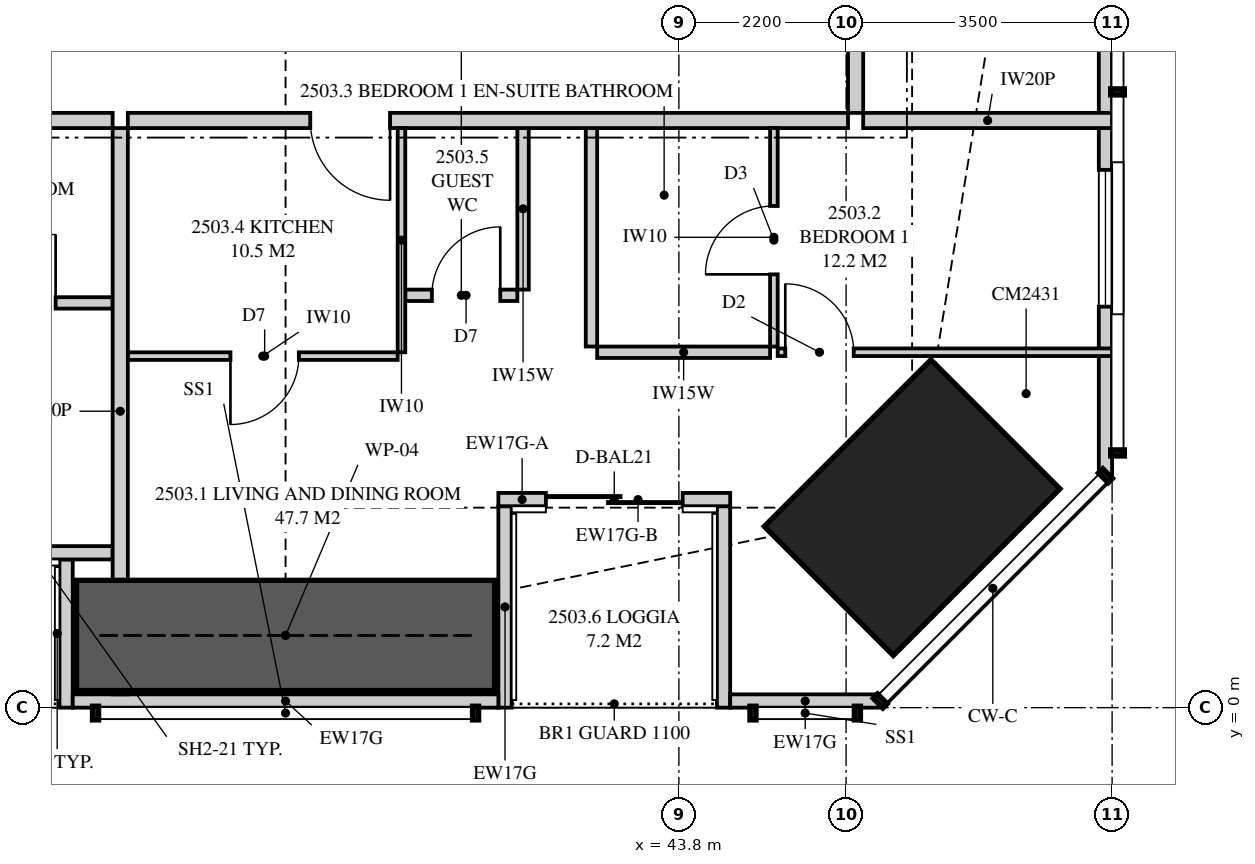
"""IFC4 building model, lengths in metres.
Left out: names, types, materials, properties, quantities, classifications, styles, units other than length and angle.
Written with IfcOpenShell. Run it as: python <this file> out.ifc"""

import sys

from ifc_helpers import new_model, si_unit, direction, frame, frame_2d, origin, origin_2d, place, context, subcontext, project, spatial, polyline, rectangle, outline, extrude, element, fill, save


model = new_model("IFC4")
c1 = context("Model", 3, precision=1e-05, world=origin(), true_north=direction((0.0, 1.0)))
c2 = subcontext(c1, "Body", "Model", "MODEL_VIEW")
j1 = project(units=[si_unit("LENGTHUNIT", "METRE"), si_unit("PLANEANGLEUNIT", "RADIAN")], contexts=[c1])
p1 = place(None, origin())
s1 = spatial("IfcSite", under=j1, at=p1, CompositionType="ELEMENT")
p2 = place(p1, origin())
s2 = spatial("IfcBuilding", under=s1, at=p2, CompositionType="ELEMENT")
p3 = place(p2, frame((0.0, 0.0, 94.8)))
s3 = spatial("IfcBuildingStorey", under=s2, at=p3, CompositionType="ELEMENT", Elevation=94.8)
p4 = place(p3, frame((46.869, 2.631, 0.0), z_axis=(0.0, 0.0, 1.0), x_axis=(-0.707106781187, 0.707106781187, 0.0)))
e1 = element("IfcColumn", 1, at=p4, inside=s3, PredefinedType="COLUMN", context=c2, shape_type="SweptSolid", body=[
    extrude(rectangle(XDim=2.4, YDim=3.1, at=origin_2d()), origin(), (0.0, 0.0, 1.0), 3.35),
])
p5 = place(p3, frame((35.825, 0.087, 0.0), z_axis=(0.0, 0.0, 1.0), x_axis=(1.0, 0.0, 0.0)))
e2 = element("IfcWall", 2, at=p5, inside=s3, PredefinedType="SOLIDWALL", context=c2, shape_type="SweptSolid", body=[
    extrude(outline(polyline([(0.0, 0.0), (5.6, 0.0), (5.6, 3.11), (3.003, 3.11), (3.003, 2.15), (2.958, 2.15), (2.958, 3.11), (2.8, 3.11), (2.8, 2.15), (0.0, 2.15), (0.0, 0.0)])), frame((0.0, 0.087, 0.0), z_axis=(0.0, -1.0, 0.0), x_axis=(1.0, 0.0, 0.0)), (0.0, 0.0, 1.0), 0.175),
])
p6 = place(p3, frame((44.475, 0.087, 0.0), z_axis=(0.0, 0.0, 1.0), x_axis=(1.0, 0.0, 0.0)))
e3 = element("IfcWall", 3, at=p6, inside=s3, PredefinedType="SOLIDWALL", context=c2, shape_type="SweptSolid", body=[
    extrude(rectangle(XDim=1.974, YDim=0.175, at=frame_2d((0.987, 0.0))), origin(), (0.0, 0.0, 1.0), 3.11),
])
p7 = place(p3, frame((32.775, 2.038, 0.0), z_axis=(0.0, 0.0, 1.0), x_axis=(1.0, 0.0, 0.0)))
e4 = element("IfcWall", 4, at=p7, inside=s3, PredefinedType="SOLIDWALL", context=c2, shape_type="SweptSolid", body=[
    extrude(rectangle(XDim=3.575, YDim=0.175, at=frame_2d((1.788, 0.0))), origin(), (0.0, 0.0, 1.0), 3.11),
])
p8 = place(p7, frame((0.625, 0.0, 0.0)))
e5 = element("IfcOpeningElement", 5, at=p8, cuts=e4, PredefinedType="OPENING", context=c2, shape_type="SweptSolid", body=[
    extrude(rectangle(XDim=1.8, YDim=2.1, at=frame_2d((0.9, 1.05))), frame((0.0, 0.097, 0.0), z_axis=(0.0, -1.0, 0.0), x_axis=(1.0, 0.0, 0.0)), (0.0, 0.0, 1.0), 0.195),
])
p9 = place(p3, frame((35.738, 0.0, 0.0), z_axis=(0.0, 0.0, 1.0), x_axis=(0.0, 1.0, 0.0)))
e6 = element("IfcWall", 6, at=p9, inside=s3, PredefinedType="SOLIDWALL", context=c2, shape_type="SweptSolid", body=[
    extrude(outline(polyline([(0.0, 0.0), (1.95, 0.0), (1.95, 3.11), (1.75, 3.11), (1.75, 2.15), (0.15, 2.15), (0.15, 3.11), (0.0, 3.11), (0.0, 0.0)])), frame((0.0, 0.087, 0.0), z_axis=(0.0, -1.0, 0.0), x_axis=(1.0, 0.0, 0.0)), (0.0, 0.0, 1.0), 0.175),
])
p10 = place(p3, frame((41.425, 2.738, 0.0), z_axis=(0.0, 0.0, 1.0), x_axis=(1.0, 0.0, 0.0)))
e7 = element("IfcWall", 7, at=p10, inside=s3, PredefinedType="SOLIDWALL", context=c2, shape_type="SweptSolid", body=[
    extrude(rectangle(XDim=0.625, YDim=0.175, at=frame_2d((0.312, 0.0))), origin(), (0.0, 0.0, 1.0), 2.51),
])
p11 = place(p3, frame((42.05, 2.738, 0.0), z_axis=(0.0, 0.0, 1.0), x_axis=(1.0, 0.0, 0.0)))
e8 = element("IfcWall", 8, at=p11, inside=s3, PredefinedType="SOLIDWALL", context=c2, shape_type="SweptSolid", body=[
    extrude(rectangle(XDim=2.425, YDim=0.175, at=frame_2d((1.212, 0.0))), origin(), (0.0, 0.0, 1.0), 2.15),
])
p12 = place(p11, origin())
e9 = element("IfcOpeningElement", 9, at=p12, cuts=e8, PredefinedType="OPENING", context=c2, shape_type="SweptSolid", body=[
    extrude(rectangle(XDim=1.8, YDim=2.1, at=frame_2d((0.9, 1.05))), frame((0.0, 0.097, 0.0), z_axis=(0.0, -1.0, 0.0), x_axis=(1.0, 0.0, 0.0)), (0.0, 0.0, 1.0), 0.195),
])
p13 = place(p3, frame((41.512, 0.0, 0.0), z_axis=(0.0, 0.0, 1.0), x_axis=(0.0, 1.0, 0.0)))
e10 = element("IfcWall", 10, at=p13, inside=s3, PredefinedType="SOLIDWALL", context=c2, shape_type="SweptSolid", body=[
    extrude(outline(polyline([(0.0, 0.0), (2.65, 0.0), (2.65, 2.51), (2.373, 2.51), (2.373, 2.15), (0.705, 2.15), (0.705, 3.11), (0.0, 3.11), (0.0, 0.0)])), frame((0.0, 0.087, 0.0), z_axis=(0.0, -1.0, 0.0), x_axis=(1.0, 0.0, 0.0)), (0.0, 0.0, 1.0), 0.175),
])
p14 = place(p3, frame((44.387, 0.0, 0.0), z_axis=(0.0, 0.0, 1.0), x_axis=(0.0, 1.0, 0.0)))
e11 = element("IfcWall", 11, at=p14, inside=s3, PredefinedType="SOLIDWALL", context=c2, shape_type="SweptSolid", body=[
    extrude(outline(polyline([(0.0, 0.0), (2.65, 0.0), (2.65, 2.15), (1.291, 2.15), (1.291, 3.11), (0.0, 3.11), (0.0, 0.0)])), frame((0.0, 0.087, 0.0), z_axis=(0.0, -1.0, 0.0), x_axis=(1.0, 0.0, 0.0)), (0.0, 0.0, 1.0), 0.175),
])
p15 = place(p3, frame((49.413, 3.051, 0.0), z_axis=(0.0, 0.0, 1.0), x_axis=(0.0, 1.0, 0.0)))
e12 = element("IfcWall", 12, at=p15, inside=s3, PredefinedType="SOLIDWALL", context=c2, shape_type="SweptSolid", body=[
    extrude(outline(polyline([(0.0, 0.0), (31.897, 0.0), (31.897, 3.11), (22.167, 3.11), (22.167, 2.15), (22.074, 2.15), (22.074, 3.11), (21.949, 3.11), (21.949, 2.15), (9.949, 2.15), (9.949, 3.11), (9.823, 3.11), (9.823, 2.15), (9.73, 2.15), (9.73, 3.11), (0.0, 3.11), (0.0, 0.0)])), frame((0.0, 0.087, 0.0), z_axis=(0.0, -1.0, 0.0), x_axis=(1.0, 0.0, 0.0)), (0.0, 0.0, 1.0), 0.175),
])
p16 = place(p15, frame((2.224, 0.0, 0.4)))
e13 = element("IfcOpeningElement", 13, at=p16, cuts=e12, PredefinedType="OPENING", context=c2, shape_type="SweptSolid", body=[
    extrude(rectangle(XDim=1.8, YDim=1.7, at=frame_2d((0.9, 0.85))), frame((0.0, 0.097, 0.0), z_axis=(0.0, -1.0, 0.0), x_axis=(1.0, 0.0, 0.0)), (0.0, 0.0, 1.0), 0.195),
])
p17 = place(p15, frame((14.849, 0.0, 0.4)))
e14 = element("IfcOpeningElement", 14, at=p17, cuts=e12, PredefinedType="OPENING", context=c2, shape_type="SweptSolid", body=[
    extrude(rectangle(XDim=1.2, YDim=1.7, at=frame_2d((0.6, 0.85))), frame((0.0, 0.097, 0.0), z_axis=(0.0, -1.0, 0.0), x_axis=(1.0, 0.0, 0.0)), (0.0, 0.0, 1.0), 0.195),
])
p18 = place(p15, frame((27.373, 0.0, 0.4)))
e15 = element("IfcOpeningElement", 15, at=p18, cuts=e12, PredefinedType="OPENING", context=c2, shape_type="SweptSolid", body=[
    extrude(rectangle(XDim=1.8, YDim=1.7, at=frame_2d((0.9, 0.85))), frame((0.0, 0.097, 0.0), z_axis=(0.0, -1.0, 0.0), x_axis=(1.0, 0.0, 0.0)), (0.0, 0.0, 1.0), 0.195),
])
p19 = place(p3, frame((36.45, 0.175, 0.0), z_axis=(0.0, 0.0, 1.0), x_axis=(0.0, 1.0, 0.0)))
e16 = element("IfcWall", 16, at=p19, inside=s3, PredefinedType="PARTITIONING", context=c2, shape_type="SweptSolid", body=[
    extrude(outline(polyline([(0.529, 2.15), (0.0, 2.15), (0.0, 0.0), (0.529, 0.0), (0.529, 0.017), (1.021, 0.017), (1.021, 0.0), (7.45, 0.0), (7.45, 3.11), (1.685, 3.11), (1.685, 2.15), (1.021, 2.15), (1.021, 2.133), (0.529, 2.133), (0.529, 2.15)])), frame((0.0, 0.1, 0.0), z_axis=(0.0, -1.0, 0.0), x_axis=(1.0, 0.0, 0.0)), (0.0, 0.0, 1.0), 0.2),
])
p20 = place(p3, frame((28.9, 7.725, 0.0), z_axis=(0.0, 0.0, 1.0), x_axis=(1.0, 0.0, 0.0)))
e17 = element("IfcWall", 17, at=p20, inside=s3, PredefinedType="PARTITIONING", context=c2, shape_type="SweptSolid", body=[
    extrude(rectangle(XDim=7.45, YDim=0.2, at=frame_2d((3.725, 0.0))), origin(), (0.0, 0.0, 1.0), 3.11),
])
p21 = place(p20, frame((3.225, 0.0, 0.0)))
e18 = element("IfcOpeningElement", 18, at=p21, cuts=e17, PredefinedType="OPENING", context=c2, shape_type="SweptSolid", body=[
    extrude(rectangle(XDim=1.05, YDim=2.2, at=frame_2d((0.525, 1.1))), frame((0.0, 0.11, 0.0), z_axis=(0.0, -1.0, 0.0), x_axis=(1.0, 0.0, 0.0)), (0.0, 0.0, 1.0), 0.22),
])
p22 = place(p3, frame((33.925, 5.325, 0.0), z_axis=(0.0, 0.0, 1.0), x_axis=(1.0, 0.0, 0.0)))
e19 = element("IfcWall", 19, at=p22, inside=s3, PredefinedType="PLUMBINGWALL", context=c2, shape_type="SweptSolid", body=[
    extrude(rectangle(XDim=2.425, YDim=0.15, at=frame_2d((1.212, 0.0))), origin(), (0.0, 0.0, 1.0), 3.11),
])
p23 = place(p22, frame((0.775, 0.0, 0.0)))
e20 = element("IfcOpeningElement", 20, at=p23, cuts=e19, PredefinedType="OPENING", context=c2, shape_type="SweptSolid", body=[
    extrude(rectangle(XDim=0.9, YDim=2.1, at=frame_2d((0.45, 1.05))), frame((0.0, 0.085, 0.0), z_axis=(0.0, -1.0, 0.0), x_axis=(1.0, 0.0, 0.0)), (0.0, 0.0, 1.0), 0.17),
])
p24 = place(p3, frame((36.55, 7.725, 0.0), z_axis=(0.0, 0.0, 1.0), x_axis=(1.0, 0.0, 0.0)))
e21 = element("IfcWall", 21, at=p24, inside=s3, PredefinedType="PARTITIONING", context=c2, shape_type="SweptSolid", body=[
    extrude(outline(polyline([(0.0, 0.0), (9.475, 0.0), (9.475, 3.11), (2.412, 3.11), (2.412, 2.541), (1.738, 2.541), (1.738, 3.11), (0.0, 3.11), (0.0, 0.0)])), frame((0.0, 0.1, 0.0), z_axis=(0.0, -1.0, 0.0), x_axis=(1.0, 0.0, 0.0)), (0.0, 0.0, 1.0), 0.2),
])
p25 = place(p24, frame((2.4, 0.0, 0.0)))
e22 = element("IfcOpeningElement", 22, at=p25, cuts=e21, PredefinedType="OPENING", context=c2, shape_type="SweptSolid", body=[
    extrude(rectangle(XDim=1.05, YDim=2.2, at=frame_2d((0.525, 1.1))), frame((0.0, 0.11, 0.0), z_axis=(0.0, -1.0, 0.0), x_axis=(1.0, 0.0, 0.0)), (0.0, 0.0, 1.0), 0.22),
])
p26 = place(p3, frame((45.05, 4.751, 0.0), z_axis=(0.0, 0.0, 1.0), x_axis=(0.0, 1.0, 0.0)))
e23 = element("IfcWall", 23, at=p26, inside=s3, PredefinedType="PARTITIONING", context=c2, shape_type="SweptSolid", body=[
    extrude(rectangle(XDim=2.874, YDim=0.1, at=frame_2d((1.437, 0.0))), origin(), (0.0, 0.0, 1.0), 3.11),
])
p27 = place(p26, frame((0.949, 0.0, 0.0)))
e24 = element("IfcOpeningElement", 24, at=p27, cuts=e23, PredefinedType="OPENING", context=c2, shape_type="SweptSolid", body=[
    extrude(rectangle(XDim=0.9, YDim=2.1, at=frame_2d((0.45, 1.05))), frame((0.0, 0.06, 0.0), z_axis=(0.0, -1.0, 0.0), x_axis=(1.0, 0.0, 0.0)), (0.0, 0.0, 1.0), 0.12),
])
p28 = place(p3, frame((45.1, 4.676, 0.0), z_axis=(0.0, 0.0, 1.0), x_axis=(1.0, 0.0, 0.0)))
e25 = element("IfcWall", 25, at=p28, inside=s3, PredefinedType="PARTITIONING", context=c2, shape_type="SweptSolid", body=[
    extrude(outline(polyline([(0.0, 0.0), (4.4, 0.0), (4.4, 3.11), (2.971, 3.11), (2.971, 2.15), (1.229, 2.15), (1.229, 3.11), (0.0, 3.11), (0.0, 0.0)])), frame((0.0, 0.05, 0.0), z_axis=(0.0, -1.0, 0.0), x_axis=(1.0, 0.0, 0.0)), (0.0, 0.0, 1.0), 0.1),
])
p29 = place(p28, frame((0.1, 0.0, 0.0)))
e26 = element("IfcOpeningElement", 26, at=p29, cuts=e25, PredefinedType="OPENING", context=c2, shape_type="SweptSolid", body=[
    extrude(rectangle(XDim=0.9, YDim=2.1, at=frame_2d((0.45, 1.05))), frame((0.0, 0.06, 0.0), z_axis=(0.0, -1.0, 0.0), x_axis=(1.0, 0.0, 0.0)), (0.0, 0.0, 1.0), 0.12),
])
p30 = place(p3, frame((42.725, 4.676, 0.0), z_axis=(0.0, 0.0, 1.0), x_axis=(1.0, 0.0, 0.0)))
e27 = element("IfcWall", 27, at=p30, inside=s3, PredefinedType="PLUMBINGWALL", context=c2, shape_type="SweptSolid", body=[
    extrude(rectangle(XDim=2.275, YDim=0.15, at=frame_2d((1.137, 0.0))), origin(), (0.0, 0.0, 1.0), 3.11),
])
p31 = place(p3, frame((42.65, 4.751, 0.0), z_axis=(0.0, 0.0, 1.0), x_axis=(0.0, 1.0, 0.0)))
e28 = element("IfcWall", 28, at=p31, inside=s3, PredefinedType="PLUMBINGWALL", context=c2, shape_type="SweptSolid", body=[
    extrude(rectangle(XDim=2.874, YDim=0.15, at=frame_2d((1.437, 0.0))), origin(), (0.0, 0.0, 1.0), 3.11),
])
p32 = place(p3, frame((36.55, 4.625, 0.0), z_axis=(0.0, 0.0, 1.0), x_axis=(1.0, 0.0, 0.0)))
e29 = element("IfcWall", 29, at=p32, inside=s3, PredefinedType="PARTITIONING", context=c2, shape_type="SweptSolid", body=[
    extrude(outline(polyline([(0.0, 0.0), (3.55, 0.0), (3.55, 3.11), (2.362, 3.11), (2.362, 2.541), (1.788, 2.541), (1.788, 3.11), (0.0, 3.11), (0.0, 0.0)])), frame((0.0, 0.05, 0.0), z_axis=(0.0, -1.0, 0.0), x_axis=(1.0, 0.0, 0.0)), (0.0, 0.0, 1.0), 0.1),
])
p33 = place(p32, frame((1.35, 0.0, 0.0)))
e30 = element("IfcOpeningElement", 30, at=p33, cuts=e29, PredefinedType="OPENING", context=c2, shape_type="SweptSolid", body=[
    extrude(rectangle(XDim=0.9, YDim=2.1, at=frame_2d((0.45, 1.05))), frame((0.0, 0.06, 0.0), z_axis=(0.0, -1.0, 0.0), x_axis=(1.0, 0.0, 0.0)), (0.0, 0.0, 1.0), 0.12),
])
p34 = place(p3, frame((40.15, 4.675, 0.0), z_axis=(0.0, 0.0, 1.0), x_axis=(0.0, 1.0, 0.0)))
e31 = element("IfcWall", 31, at=p34, inside=s3, PredefinedType="PARTITIONING", context=c2, shape_type="SweptSolid", body=[
    extrude(rectangle(XDim=2.95, YDim=0.1, at=frame_2d((1.475, 0.0))), origin(), (0.0, 0.0, 1.0), 3.11),
])
p35 = place(p3, frame((40.2, 5.425, 0.0), z_axis=(0.0, 0.0, 1.0), x_axis=(1.0, 0.0, 0.0)))
e32 = element("IfcWall", 32, at=p35, inside=s3, PredefinedType="PLUMBINGWALL", context=c2, shape_type="SweptSolid", body=[
    extrude(rectangle(XDim=1.475, YDim=0.15, at=frame_2d((0.738, 0.0))), origin(), (0.0, 0.0, 1.0), 3.11),
])
p36 = place(p35, frame((0.35, 0.0, 0.0)))
e33 = element("IfcOpeningElement", 33, at=p36, cuts=e32, PredefinedType="OPENING", context=c2, shape_type="SweptSolid", body=[
    extrude(rectangle(XDim=0.9, YDim=2.1, at=frame_2d((0.45, 1.05))), frame((0.0, 0.085, 0.0), z_axis=(0.0, -1.0, 0.0), x_axis=(1.0, 0.0, 0.0)), (0.0, 0.0, 1.0), 0.17),
])
p37 = place(p3, frame((41.75, 5.5, 0.0), z_axis=(0.0, 0.0, 1.0), x_axis=(0.0, 1.0, 0.0)))
e34 = element("IfcWall", 34, at=p37, inside=s3, PredefinedType="PLUMBINGWALL", context=c2, shape_type="SweptSolid", body=[
    extrude(rectangle(XDim=2.125, YDim=0.15, at=frame_2d((1.062, 0.0))), origin(), (0.0, 0.0, 1.0), 3.11),
])
p38 = place(p3, frame((46.225, 7.725, 0.0), z_axis=(0.0, 0.0, 1.0), x_axis=(1.0, 0.0, 0.0)))
e35 = element("IfcWall", 35, at=p38, inside=s3, PredefinedType="PARTITIONING", context=c2, shape_type="SweptSolid", body=[
    extrude(outline(polyline([(0.0, 0.0), (3.275, 0.0), (3.275, 3.11), (2.392, 3.11), (2.392, 2.15), (0.643, 2.15), (0.643, 2.541), (0.306, 2.541), (0.306, 3.11), (0.0, 3.11), (0.0, 0.0)])), frame((0.0, 0.1, 0.0), z_axis=(0.0, -1.0, 0.0), x_axis=(1.0, 0.0, 0.0)), (0.0, 0.0, 1.0), 0.2),
])
p39 = place(p3, frame((46.125, 7.825, 0.0), z_axis=(0.0, 0.0, 1.0), x_axis=(0.0, 1.0, 0.0)))
e36 = element("IfcWall", 36, at=p39, inside=s3, PredefinedType="PARTITIONING", context=c2, shape_type="SweptSolid", body=[
    extrude(outline(polyline([(0.0, 0.0), (8.475, 0.0), (8.475, 3.11), (5.512, 3.11), (5.512, 2.541), (4.838, 2.541), (4.838, 3.11), (0.0, 3.11), (0.0, 0.0)])), frame((0.0, 0.1, 0.0), z_axis=(0.0, -1.0, 0.0), x_axis=(1.0, 0.0, 0.0)), (0.0, 0.0, 1.0), 0.2),
])
p40 = place(p3, frame((35.875, 0.95, 0.0), z_axis=(0.0, 0.0, 1.0), x_axis=(1.0, 0.0, 0.0)))
e37 = element("IfcWall", 37, at=p40, inside=s3, PredefinedType="SHEAR", context=c2, shape_type="SweptSolid", body=[
    extrude(rectangle(XDim=5.5, YDim=1.45, at=frame_2d((2.75, 0.0))), origin(), (0.0, 0.0, 1.0), 3.35),
])
p41 = place(p12, origin())
e38 = element("IfcDoor", 38, at=p41, inside=s3, OperationType="SLIDING_TO_LEFT", PredefinedType="DOOR", context=c2, shape_type="SweptSolid", body=[
    extrude(rectangle(XDim=1.8, YDim=2.1, at=frame_2d((0.9, 1.05))), frame((0.0, 0.025, 0.0), z_axis=(0.0, -1.0, 0.0), x_axis=(1.0, 0.0, 0.0)), (0.0, 0.0, 1.0), 0.05),
])
fill(e9, e38)
p42 = place(p16, origin())
e39 = element("IfcWindow", 39, at=p42, inside=s3, PartitioningType="SINGLE_PANEL", PredefinedType="WINDOW", context=c2, shape_type="SweptSolid", body=[
    extrude(rectangle(XDim=1.8, YDim=1.7, at=frame_2d((0.9, 0.85))), frame((0.0, 0.03, 0.0), z_axis=(0.0, -1.0, 0.0), x_axis=(1.0, 0.0, 0.0)), (0.0, 0.0, 1.0), 0.06),
])
fill(e13, e39)
p43 = place(p23, origin())
e40 = element("IfcDoor", 40, at=p43, inside=s3, OperationType="SINGLE_SWING_RIGHT", PredefinedType="DOOR", context=c2, shape_type="SweptSolid", body=[
    extrude(rectangle(XDim=0.9, YDim=2.1, at=frame_2d((0.45, 1.05))), frame((0.0, 0.025, 0.0), z_axis=(0.0, -1.0, 0.0), x_axis=(1.0, 0.0, 0.0)), (0.0, 0.0, 1.0), 0.05),
])
fill(e20, e40)
p44 = place(p25, frame((1.05, 0.0, 0.0), z_axis=(0.0, 0.0, 1.0), x_axis=(-1.0, 0.0, 0.0)))
e41 = element("IfcDoor", 41, at=p44, inside=s3, OperationType="SINGLE_SWING_LEFT", PredefinedType="DOOR", context=c2, shape_type="SweptSolid", body=[
    extrude(rectangle(XDim=1.05, YDim=2.2, at=frame_2d((0.525, 1.1))), frame((0.0, 0.025, 0.0), z_axis=(0.0, -1.0, 0.0), x_axis=(1.0, 0.0, 0.0)), (0.0, 0.0, 1.0), 0.05),
])
fill(e22, e41)
p45 = place(p29, origin())
e42 = element("IfcDoor", 42, at=p45, inside=s3, OperationType="SINGLE_SWING_LEFT", PredefinedType="DOOR", context=c2, shape_type="SweptSolid", body=[
    extrude(rectangle(XDim=0.9, YDim=2.1, at=frame_2d((0.45, 1.05))), frame((0.0, 0.025, 0.0), z_axis=(0.0, -1.0, 0.0), x_axis=(1.0, 0.0, 0.0)), (0.0, 0.0, 1.0), 0.05),
])
fill(e26, e42)
p46 = place(p27, origin())
e43 = element("IfcDoor", 43, at=p46, inside=s3, OperationType="SINGLE_SWING_LEFT", PredefinedType="DOOR", context=c2, shape_type="SweptSolid", body=[
    extrude(rectangle(XDim=0.9, YDim=2.1, at=frame_2d((0.45, 1.05))), frame((0.0, 0.025, 0.0), z_axis=(0.0, -1.0, 0.0), x_axis=(1.0, 0.0, 0.0)), (0.0, 0.0, 1.0), 0.05),
])
fill(e24, e43)
p47 = place(p33, frame((0.9, 0.0, 0.0), z_axis=(0.0, 0.0, 1.0), x_axis=(-1.0, 0.0, 0.0)))
e44 = element("IfcDoor", 44, at=p47, inside=s3, OperationType="SINGLE_SWING_RIGHT", PredefinedType="DOOR", context=c2, shape_type="SweptSolid", body=[
    extrude(rectangle(XDim=0.9, YDim=2.1, at=frame_2d((0.45, 1.05))), frame((0.0, 0.025, 0.0), z_axis=(0.0, -1.0, 0.0), x_axis=(1.0, 0.0, 0.0)), (0.0, 0.0, 1.0), 0.05),
])
fill(e30, e44)
p48 = place(p36, origin())
e45 = element("IfcDoor", 45, at=p48, inside=s3, OperationType="SINGLE_SWING_RIGHT", PredefinedType="DOOR", context=c2, shape_type="SweptSolid", body=[
    extrude(rectangle(XDim=0.9, YDim=2.1, at=frame_2d((0.45, 1.05))), frame((0.0, 0.025, 0.0), z_axis=(0.0, -1.0, 0.0), x_axis=(1.0, 0.0, 0.0)), (0.0, 0.0, 1.0), 0.05),
])
fill(e33, e45)
save(model, sys.argv[1])
